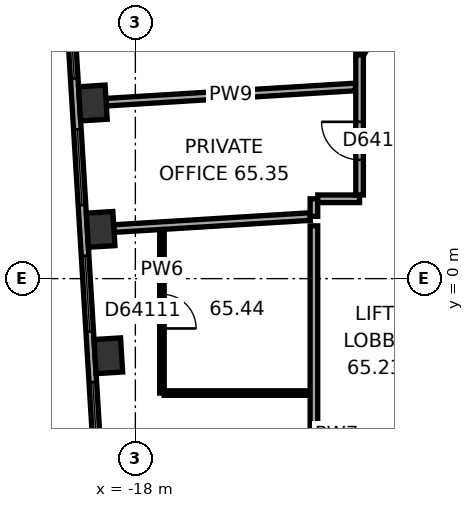
"""IFC4 building model, lengths in metres.
Left out: names, types, materials, properties, quantities, classifications, styles, units other than length and angle.
Written with IfcOpenShell. Run it as: python <this file> out.ifc"""

import sys

from ifc_helpers import new_model, si_unit, direction, frame, frame_2d, origin, origin_2d, place, context, subcontext, project, spatial, rectangle, extrude, element, fill, save


model = new_model("IFC4")
c1 = context("Model", 3, precision=1e-05, world=origin(), true_north=direction((0.0, 1.0)))
c2 = subcontext(c1, "Body", "Model", "MODEL_VIEW")
j1 = project(units=[si_unit("LENGTHUNIT", "METRE"), si_unit("PLANEANGLEUNIT", "RADIAN")], contexts=[c1])
p1 = place(None, origin())
s1 = spatial("IfcSite", under=j1, at=p1, CompositionType="ELEMENT")
p2 = place(p1, origin())
s2 = spatial("IfcBuilding", under=s1, at=p2, CompositionType="ELEMENT")
p3 = place(p2, frame((0.0, 0.0, 263.5)))
s3 = spatial("IfcBuildingStorey", under=s2, at=p3, CompositionType="ELEMENT", Elevation=263.5)
for number, where, z_axis, x_axis in (
    (1, (-19.118, 4.621, 0.0), (0.0, 0.0, 1.0), (0.061, -0.998, 0.0)),
    (2, (-18.914, 1.296, 0.0), (0.0, 0.0, 1.0), (0.061, -0.998, 0.0)),
    (3, (-18.711, -2.03, 0.0), (0.0, 0.0, 1.0), (0.061, -0.998, 0.0)),
):
    element("IfcColumn", number, at=place(p3, frame(where, z_axis=z_axis, x_axis=x_axis)), inside=s3, PredefinedType="COLUMN", context=c2, shape_type="SweptSolid", body=[
        extrude(rectangle(XDim=0.9, YDim=0.7, at=origin_2d()), origin(), (0.0, 0.0, 1.0), 3.7),
    ])
p4 = place(p3, frame((-19.803, 8.454, 0.0), z_axis=(0.0, 0.0, 1.0), x_axis=(0.061036717565, -0.998135521414, 0.0)))
e4 = element("IfcWall", 4, at=p4, inside=s3, PredefinedType="STANDARD", context=c2, shape_type="SweptSolid", body=[
    extrude(rectangle(XDim=17.731, YDim=0.2, at=frame_2d((8.866, 0.0))), origin(), (0.0, 0.0, 1.0), 3.7),
])
p5 = place(p4, frame((1.202, 0.0, 0.9)))
e5 = element("IfcOpeningElement", 5, at=p5, cuts=e4, PredefinedType="OPENING", context=c2, shape_type="SweptSolid", body=[
    extrude(rectangle(XDim=2.0, YDim=2.0, at=frame_2d((1.0, 1.0))), frame((0.0, 0.11, 0.0), z_axis=(0.0, -1.0, 0.0), x_axis=(1.0, 0.0, 0.0)), (0.0, 0.0, 1.0), 0.22),
])
p6 = place(p4, frame((4.533, 0.0, 0.9)))
e6 = element("IfcOpeningElement", 6, at=p6, cuts=e4, PredefinedType="OPENING", context=c2, shape_type="SweptSolid", body=[
    extrude(rectangle(XDim=2.0, YDim=2.0, at=frame_2d((1.0, 1.0))), frame((0.0, 0.11, 0.0), z_axis=(0.0, -1.0, 0.0), x_axis=(1.0, 0.0, 0.0)), (0.0, 0.0, 1.0), 0.22),
])
p7 = place(p4, frame((7.865, 0.0, 0.9)))
e7 = element("IfcOpeningElement", 7, at=p7, cuts=e4, PredefinedType="OPENING", context=c2, shape_type="SweptSolid", body=[
    extrude(rectangle(XDim=2.0, YDim=2.0, at=frame_2d((1.0, 1.0))), frame((0.0, 0.11, 0.0), z_axis=(0.0, -1.0, 0.0), x_axis=(1.0, 0.0, 0.0)), (0.0, 0.0, 1.0), 0.22),
])
p8 = place(p4, frame((11.197, 0.0, 0.9)))
e8 = element("IfcOpeningElement", 8, at=p8, cuts=e4, PredefinedType="OPENING", context=c2, shape_type="SweptSolid", body=[
    extrude(rectangle(XDim=2.0, YDim=2.0, at=frame_2d((1.0, 1.0))), frame((0.0, 0.11, 0.0), z_axis=(0.0, -1.0, 0.0), x_axis=(1.0, 0.0, 0.0)), (0.0, 0.0, 1.0), 0.22),
])
p9 = place(p4, frame((14.528, 0.0, 0.9)))
e9 = element("IfcOpeningElement", 9, at=p9, cuts=e4, PredefinedType="OPENING", context=c2, shape_type="SweptSolid", body=[
    extrude(rectangle(XDim=2.0, YDim=2.0, at=frame_2d((1.0, 1.0))), frame((0.0, 0.11, 0.0), z_axis=(0.0, -1.0, 0.0), x_axis=(1.0, 0.0, 0.0)), (0.0, 0.0, 1.0), 0.22),
])
p10 = place(p3, frame((-18.768, 4.643, 0.0), z_axis=(0.0, 0.0, 1.0), x_axis=(0.99813496285, 0.0610458511, 0.0)))
e10 = element("IfcWall", 10, at=p10, inside=s3, PredefinedType="PARTITIONING", context=c2, shape_type="SweptSolid", body=[
    extrude(rectangle(XDim=6.571, YDim=0.2, at=frame_2d((3.285, 0.0))), origin(), (0.0, 0.0, 1.0), 3.42),
])
p11 = place(p3, frame((-18.565, 1.317, 0.0), z_axis=(0.0, 0.0, 1.0), x_axis=(0.998136844425, 0.061015078472, 0.0)))
e11 = element("IfcWall", 11, at=p11, inside=s3, PredefinedType="PARTITIONING", context=c2, shape_type="SweptSolid", body=[
    extrude(rectangle(XDim=5.174, YDim=0.2, at=frame_2d((2.587, 0.0))), origin(), (0.0, 0.0, 1.0), 2.87),
])
p12 = place(p3, frame((-17.301, -3.011, 0.0), z_axis=(0.0, 0.0, 1.0), x_axis=(0.0, 1.0, 0.0)))
e12 = element("IfcWall", 12, at=p12, inside=s3, PredefinedType="PARTITIONING", context=c2, shape_type="SweptSolid", body=[
    extrude(rectangle(XDim=4.3, YDim=0.12, at=frame_2d((2.15, 0.0))), origin(), (0.0, 0.0, 1.0), 3.42),
])
p13 = place(p12, frame((1.7, 0.0, 0.0)))
e13 = element("IfcOpeningElement", 13, at=p13, cuts=e12, PredefinedType="OPENING", context=c2, shape_type="SweptSolid", body=[
    extrude(rectangle(XDim=0.9, YDim=2.1, at=frame_2d((0.45, 1.05))), frame((0.0, 0.07, 0.0), z_axis=(0.0, -1.0, 0.0), x_axis=(1.0, 0.0, 0.0)), (0.0, 0.0, 1.0), 0.14),
])
p14 = place(p3, frame((-13.401, -3.011, 0.0), z_axis=(0.0, 0.0, 1.0), x_axis=(-1.0, 0.0, 0.0)))
e14 = element("IfcWall", 14, at=p14, inside=s3, PredefinedType="PARTITIONING", context=c2, shape_type="SweptSolid", body=[
    extrude(rectangle(XDim=3.84, YDim=0.12, at=frame_2d((1.92, 0.0))), origin(), (0.0, 0.0, 1.0), 3.42),
])
p15 = place(p3, frame((-13.301, 1.389, 0.0), z_axis=(0.0, 0.0, 1.0), x_axis=(0.0, -1.0, 0.0)))
e15 = element("IfcWall", 15, at=p15, inside=s3, PredefinedType="PARTITIONING", context=c2, shape_type="SweptSolid", body=[
    extrude(rectangle(XDim=5.39, YDim=0.2, at=frame_2d((2.695, 0.0))), origin(), (0.0, 0.0, 1.0), 3.42),
])
p16 = place(p3, frame((-13.301, 2.101, 0.0), z_axis=(0.0, 0.0, 1.0), x_axis=(0.0, -1.0, 0.0)))
e16 = element("IfcWall", 16, at=p16, inside=s3, PredefinedType="PARTITIONING", context=c2, shape_type="SweptSolid", body=[
    extrude(rectangle(XDim=0.462, YDim=0.2, at=frame_2d((0.231, 0.0))), origin(), (0.0, 0.0, 1.0), 3.42),
])
p17 = place(p3, frame((-12.1, 2.101, 0.0), z_axis=(0.0, 0.0, 1.0), x_axis=(-1.0, 0.0, 0.0)))
e17 = element("IfcWall", 17, at=p17, inside=s3, PredefinedType="PARTITIONING", context=c2, shape_type="SweptSolid", body=[
    extrude(rectangle(XDim=1.101, YDim=0.2, at=frame_2d((0.55, 0.0))), origin(), (0.0, 0.0, 1.0), 3.42),
])
p18 = place(p3, frame((-12.1, 5.889, 0.0), z_axis=(0.0, 0.0, 1.0), x_axis=(0.0, -1.0, 0.0)))
e18 = element("IfcWall", 18, at=p18, inside=s3, PredefinedType="PARTITIONING", context=c2, shape_type="SweptSolid", body=[
    extrude(rectangle(XDim=3.688, YDim=0.2, at=frame_2d((1.844, 0.0))), origin(), (0.0, 0.0, 1.0), 3.42),
])
p19 = place(p18, frame((1.763, 0.0, 0.0)))
e19 = element("IfcOpeningElement", 19, at=p19, cuts=e18, PredefinedType="OPENING", context=c2, shape_type="SweptSolid", body=[
    extrude(rectangle(XDim=1.0, YDim=2.1, at=frame_2d((0.5, 1.05))), frame((0.0, 0.11, 0.0), z_axis=(0.0, -1.0, 0.0), x_axis=(1.0, 0.0, 0.0)), (0.0, 0.0, 1.0), 0.22),
])
p20 = place(p3, frame((-11.15, 7.534, 0.0), z_axis=(0.0, 0.0, 1.0), x_axis=(-0.500063286585, -0.865988862174, 0.0)))
e20 = element("IfcWall", 20, at=p20, inside=s3, PredefinedType="PARTITIONING", context=c2, shape_type="SweptSolid", body=[
    extrude(rectangle(XDim=1.86, YDim=0.2, at=frame_2d((0.93, 0.0))), origin(), (0.0, 0.0, 1.0), 3.42),
])
p21 = place(p5, origin())
e21 = element("IfcWindow", 21, at=p21, inside=s3, PartitioningType="SINGLE_PANEL", PredefinedType="WINDOW", context=c2, shape_type="SweptSolid", body=[
    extrude(rectangle(XDim=2.0, YDim=2.0, at=frame_2d((1.0, 1.0))), frame((0.0, 0.03, 0.0), z_axis=(0.0, -1.0, 0.0), x_axis=(1.0, 0.0, 0.0)), (0.0, 0.0, 1.0), 0.06),
])
fill(e5, e21)
p22 = place(p6, origin())
e22 = element("IfcWindow", 22, at=p22, inside=s3, PartitioningType="SINGLE_PANEL", PredefinedType="WINDOW", context=c2, shape_type="SweptSolid", body=[
    extrude(rectangle(XDim=2.0, YDim=2.0, at=frame_2d((1.0, 1.0))), frame((0.0, 0.03, 0.0), z_axis=(0.0, -1.0, 0.0), x_axis=(1.0, 0.0, 0.0)), (0.0, 0.0, 1.0), 0.06),
])
fill(e6, e22)
p23 = place(p7, origin())
e23 = element("IfcWindow", 23, at=p23, inside=s3, PartitioningType="SINGLE_PANEL", PredefinedType="WINDOW", context=c2, shape_type="SweptSolid", body=[
    extrude(rectangle(XDim=2.0, YDim=2.0, at=frame_2d((1.0, 1.0))), frame((0.0, 0.03, 0.0), z_axis=(0.0, -1.0, 0.0), x_axis=(1.0, 0.0, 0.0)), (0.0, 0.0, 1.0), 0.06),
])
fill(e7, e23)
p24 = place(p8, origin())
e24 = element("IfcWindow", 24, at=p24, inside=s3, PartitioningType="SINGLE_PANEL", PredefinedType="WINDOW", context=c2, shape_type="SweptSolid", body=[
    extrude(rectangle(XDim=2.0, YDim=2.0, at=frame_2d((1.0, 1.0))), frame((0.0, 0.03, 0.0), z_axis=(0.0, -1.0, 0.0), x_axis=(1.0, 0.0, 0.0)), (0.0, 0.0, 1.0), 0.06),
])
fill(e8, e24)
p25 = place(p19, origin())
e25 = element("IfcDoor", 25, at=p25, inside=s3, OperationType="SINGLE_SWING_LEFT", PredefinedType="DOOR", context=c2, shape_type="SweptSolid", body=[
    extrude(rectangle(XDim=1.0, YDim=2.1, at=frame_2d((0.5, 1.05))), frame((0.0, 0.025, 0.0), z_axis=(0.0, -1.0, 0.0), x_axis=(1.0, 0.0, 0.0)), (0.0, 0.0, 1.0), 0.05),
])
fill(e19, e25)
p26 = place(p13, origin())
e26 = element("IfcDoor", 26, at=p26, inside=s3, OperationType="SINGLE_SWING_LEFT", PredefinedType="DOOR", context=c2, shape_type="SweptSolid", body=[
    extrude(rectangle(XDim=0.9, YDim=2.1, at=frame_2d((0.45, 1.05))), frame((0.0, 0.025, 0.0), z_axis=(0.0, -1.0, 0.0), x_axis=(1.0, 0.0, 0.0)), (0.0, 0.0, 1.0), 0.05),
])
fill(e13, e26)
save(model, sys.argv[1])
